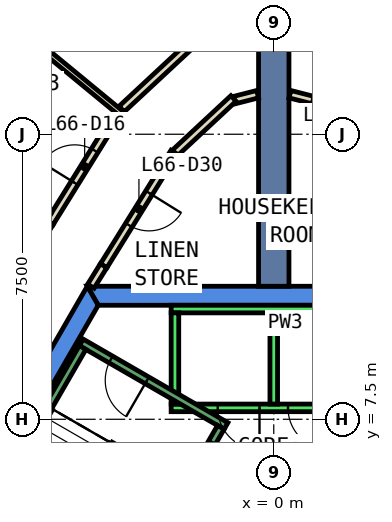
"""IFC4 building model, lengths in metres.
Left out: names, types, materials, properties, quantities, classifications, styles, units other than length and angle.
Written with IfcOpenShell. Run it as: python <this file> out.ifc"""

import sys

from ifc_helpers import new_model, si_unit, direction, frame, frame_2d, origin, place, context, subcontext, project, spatial, polyline, rectangle, outline, extrude, element, fill, save


model = new_model("IFC4")
c1 = context("Model", 3, precision=1e-05, world=origin(), true_north=direction((0.0, 1.0)))
c2 = subcontext(c1, "Body", "Model", "MODEL_VIEW")
j1 = project(units=[si_unit("LENGTHUNIT", "METRE"), si_unit("PLANEANGLEUNIT", "RADIAN")], contexts=[c1])
p1 = place(None, origin())
s1 = spatial("IfcSite", under=j1, at=p1, CompositionType="ELEMENT")
p2 = place(p1, origin())
s2 = spatial("IfcBuilding", under=s1, at=p2, CompositionType="ELEMENT")
p3 = place(p2, frame((0.0, 0.0, 286.4)))
s3 = spatial("IfcBuildingStorey", under=s2, at=p3, CompositionType="ELEMENT", Elevation=286.4)
p4 = place(p3, frame((0.0, 0.0, -0.6)))
e1 = element("IfcWall", 1, at=p4, inside=s3, PredefinedType="SHEAR", context=c2, shape_type="SweptSolid", body=[
    extrude(outline(polyline([(4.907, 11.0), (-4.907, 11.0), (-4.619, 10.5), (4.619, 10.5), (4.907, 11.0)])), origin(), (0.0, 0.0, 1.0), 3.86),
])
p5 = place(p3, frame((0.0, 0.0, -0.6)))
e2 = element("IfcWall", 2, at=p5, inside=s3, PredefinedType="SHEAR", context=c2, shape_type="SweptSolid", body=[
    extrude(outline(polyline([(-9.236, 3.502), (-8.803, 3.253), (-4.619, 10.5), (-4.907, 11.0), (-9.236, 3.502)])), origin(), (0.0, 0.0, 1.0), 3.86),
])
p6 = place(p3, frame((0.0, 11.0, -0.6), z_axis=(0.0, 0.0, 1.0), x_axis=(0.0, 1.0, 0.0)))
e3 = element("IfcWall", 3, at=p6, inside=s3, PredefinedType="SHEAR", context=c2, shape_type="SweptSolid", body=[
    extrude(rectangle(XDim=9.0, YDim=0.8, at=frame_2d((4.5, 0.0))), origin(), (0.0, 0.0, 1.0), 3.86),
])
p7 = place(p3, frame((2.6, 14.509, 0.0), z_axis=(0.0, 0.0, 1.0), x_axis=(-0.732355024595, 0.680922989735, 0.0)))
e4 = element("IfcWall", 4, at=p7, inside=s3, PredefinedType="PARTITIONING", context=c2, shape_type="SweptSolid", body=[
    extrude(rectangle(XDim=2.103, YDim=0.2, at=frame_2d((1.051, 0.0))), origin(), (0.0, 0.0, 1.0), 3.26),
])
for number, where, z_axis, x_axis in (
    (5, (1.036, 15.898, 0.0), (0.0, 0.0, 1.0), (-0.969, 0.247, 0.0)),
    (6, (-0.425, 16.054, 0.0), (0.0, 0.0, 1.0), (-0.969, -0.247, 0.0)),
):
    element("IfcWall", number, at=place(p3, frame(where, z_axis=z_axis, x_axis=x_axis)), inside=s3, PredefinedType="PARTITIONING", context=c2, shape_type="SweptSolid", body=[
        extrude(rectangle(XDim=0.63, YDim=0.2, at=frame_2d((0.315, 0.0))), origin(), (0.0, 0.0, 1.0), 3.26),
    ])
p8 = place(p3, frame((-1.06, 15.941, 0.0), z_axis=(0.0, 0.0, 1.0), x_axis=(-0.732355024595, -0.680922989735, 0.0)))
e7 = element("IfcWall", 7, at=p8, inside=s3, PredefinedType="PARTITIONING", context=c2, shape_type="SweptSolid", body=[
    extrude(rectangle(XDim=2.103, YDim=0.2, at=frame_2d((1.051, 0.0))), origin(), (0.0, 0.0, 1.0), 3.26),
])
p9 = place(p3, frame((-2.62, 14.526, 0.0), z_axis=(0.0, 0.0, 1.0), x_axis=(-0.527787942423, -0.849376175692, 0.0)))
e8 = element("IfcWall", 8, at=p9, inside=s3, PredefinedType="PARTITIONING", context=c2, shape_type="SweptSolid", body=[
    extrude(rectangle(XDim=3.517, YDim=0.2, at=frame_2d((1.758, 0.0))), origin(), (0.0, 0.0, 1.0), 3.26),
])
p10 = place(p9, frame((1.258, 0.0, 0.0)))
e9 = element("IfcOpeningElement", 9, at=p10, cuts=e8, PredefinedType="OPENING", context=c2, shape_type="SweptSolid", body=[
    extrude(rectangle(XDim=1.0, YDim=2.1, at=frame_2d((0.5, 1.05))), frame((0.0, 0.11, 0.0), z_axis=(0.0, -1.0, 0.0), x_axis=(1.0, 0.0, 0.0)), (0.0, 0.0, 1.0), 0.22),
])
p11 = place(p3, frame((-4.478, 11.54, 0.0), z_axis=(0.0, 0.0, 1.0), x_axis=(-0.527362861778, -0.849640166198, 0.0)))
e10 = element("IfcWall", 10, at=p11, inside=s3, PredefinedType="PARTITIONING", context=c2, shape_type="SweptSolid", body=[
    extrude(rectangle(XDim=0.633, YDim=0.2, at=frame_2d((0.317, 0.0))), origin(), (0.0, 0.0, 1.0), 3.26),
])
p12 = place(p3, frame((-4.002, 15.663, 0.0), z_axis=(0.0, 0.0, 1.0), x_axis=(0.732331154554, 0.680948661846, 0.0)))
e11 = element("IfcWall", 11, at=p12, inside=s3, PredefinedType="PARTITIONING", context=c2, shape_type="SweptSolid", body=[
    extrude(rectangle(XDim=2.803, YDim=0.2, at=frame_2d((1.402, 0.0))), origin(), (0.0, 0.0, 1.0), 3.26),
])
p13 = place(p3, frame((-5.889, 12.675, 0.0), z_axis=(0.0, 0.0, 1.0), x_axis=(0.527550626699, 0.849523593709, 0.0)))
e12 = element("IfcWall", 12, at=p13, inside=s3, PredefinedType="PARTITIONING", context=c2, shape_type="SweptSolid", body=[
    extrude(rectangle(XDim=3.463, YDim=0.2, at=frame_2d((1.731, 0.0))), origin(), (0.0, 0.0, 1.0), 3.26),
])
p14 = place(p13, frame((1.231, 0.0, 0.0)))
e13 = element("IfcOpeningElement", 13, at=p14, cuts=e12, PredefinedType="OPENING", context=c2, shape_type="SweptSolid", body=[
    extrude(rectangle(XDim=1.0, YDim=2.1, at=frame_2d((0.5, 1.05))), frame((0.0, 0.11, 0.0), z_axis=(0.0, -1.0, 0.0), x_axis=(1.0, 0.0, 0.0)), (0.0, 0.0, 1.0), 0.22),
])
p15 = place(p3, frame((-7.472, 10.127, 0.0), z_axis=(0.0, 0.0, 1.0), x_axis=(0.527707224705, 0.849426326996, 0.0)))
e14 = element("IfcWall", 14, at=p15, inside=s3, PredefinedType="PARTITIONING", context=c2, shape_type="SweptSolid", body=[
    extrude(rectangle(XDim=3.0, YDim=0.2, at=frame_2d((1.5, 0.0))), origin(), (0.0, 0.0, 1.0), 3.26),
])
p16 = place(p3, frame((-3.998, 15.532, 0.0), z_axis=(0.0, 0.0, 1.0), x_axis=(-0.771938186867, 0.635697597649, 0.0)))
e15 = element("IfcWall", 15, at=p16, inside=s3, PredefinedType="PARTITIONING", context=c2, shape_type="SweptSolid", body=[
    extrude(rectangle(XDim=4.432, YDim=0.15, at=frame_2d((2.216, 0.0))), origin(), (0.0, 0.0, 1.0), 3.26),
])
p17 = place(p3, frame((2.7, 7.8, 0.0), z_axis=(0.0, 0.0, 1.0), x_axis=(-1.0, 0.0, 0.0)))
e16 = element("IfcWall", 16, at=p17, inside=s3, PredefinedType="STANDARD", context=c2, shape_type="SweptSolid", body=[
    extrude(rectangle(XDim=5.4, YDim=0.2, at=frame_2d((2.7, 0.0))), origin(), (0.0, 0.0, 1.0), 3.26),
])
p18 = place(p17, frame((1.225, 0.0, 0.0)))
e17 = element("IfcOpeningElement", 17, at=p18, cuts=e16, PredefinedType="OPENING", context=c2, shape_type="SweptSolid", body=[
    extrude(rectangle(XDim=1.1, YDim=2.1, at=frame_2d((0.55, 1.05))), frame((0.0, 0.11, 0.0), z_axis=(0.0, -1.0, 0.0), x_axis=(1.0, 0.0, 0.0)), (0.0, 0.0, 1.0), 0.22),
])
p19 = place(p17, frame((3.075, 0.0, 0.0)))
e18 = element("IfcOpeningElement", 18, at=p19, cuts=e16, PredefinedType="OPENING", context=c2, shape_type="SweptSolid", body=[
    extrude(rectangle(XDim=1.1, YDim=2.1, at=frame_2d((0.55, 1.05))), frame((0.0, 0.11, 0.0), z_axis=(0.0, -1.0, 0.0), x_axis=(1.0, 0.0, 0.0)), (0.0, 0.0, 1.0), 0.22),
])
p20 = place(p3, frame((2.7, 10.4, 0.0), z_axis=(0.0, 0.0, 1.0), x_axis=(-1.0, 0.0, 0.0)))
e19 = element("IfcWall", 19, at=p20, inside=s3, PredefinedType="STANDARD", context=c2, shape_type="SweptSolid", body=[
    extrude(rectangle(XDim=5.4, YDim=0.2, at=frame_2d((2.7, 0.0))), origin(), (0.0, 0.0, 1.0), 3.26),
])
for number, where, z_axis, x_axis in (
    (20, (0.0, 7.9, 0.0), (0.0, 0.0, 1.0), (0.0, 1.0, 0.0)),
    (21, (-2.6, 7.9, 0.0), (0.0, 0.0, 1.0), (0.0, 1.0, 0.0)),
):
    element("IfcWall", number, at=place(p3, frame(where, z_axis=z_axis, x_axis=x_axis)), inside=s3, PredefinedType="STANDARD", context=c2, shape_type="SweptSolid", body=[
        extrude(rectangle(XDim=2.4, YDim=0.2, at=frame_2d((1.2, 0.0))), origin(), (0.0, 0.0, 1.0), 3.26),
    ])
p21 = place(p3, frame((-1.256, 7.324, 0.0), z_axis=(0.0, 0.0, 1.0), x_axis=(-0.866046073146, 0.499964197906, 0.0)))
e22 = element("IfcWall", 22, at=p21, inside=s3, PredefinedType="STANDARD", context=c2, shape_type="SweptSolid", body=[
    extrude(rectangle(XDim=4.4, YDim=0.2, at=frame_2d((2.2, 0.0))), origin(), (0.0, 0.0, 1.0), 3.26),
])
p22 = place(p21, frame((2.4, 0.0, 0.0)))
e23 = element("IfcOpeningElement", 23, at=p22, cuts=e22, PredefinedType="OPENING", context=c2, shape_type="SweptSolid", body=[
    extrude(rectangle(XDim=1.1, YDim=2.2, at=frame_2d((0.55, 1.1))), frame((0.0, 0.11, 0.0), z_axis=(0.0, -1.0, 0.0), x_axis=(1.0, 0.0, 0.0)), (0.0, 0.0, 1.0), 0.22),
])
p23 = place(p3, frame((-1.393, 7.288, 0.0), z_axis=(0.0, 0.0, 1.0), x_axis=(-0.499963383562, -0.866046543262, 0.0)))
e24 = element("IfcWall", 24, at=p23, inside=s3, PredefinedType="STANDARD", context=c2, shape_type="SweptSolid", body=[
    extrude(rectangle(XDim=6.9, YDim=0.2, at=frame_2d((3.45, 0.0))), origin(), (0.0, 0.0, 1.0), 3.26),
])
p24 = place(p23, frame((0.45, 0.0, 0.0)))
e25 = element("IfcOpeningElement", 25, at=p24, cuts=e24, PredefinedType="OPENING", context=c2, shape_type="SweptSolid", body=[
    extrude(rectangle(XDim=1.1, YDim=2.2, at=frame_2d((0.55, 1.1))), frame((0.0, 0.11, 0.0), z_axis=(0.0, -1.0, 0.0), x_axis=(1.0, 0.0, 0.0)), (0.0, 0.0, 1.0), 0.22),
])
p25 = place(p3, frame((-5.03, 9.388, 0.0), z_axis=(0.0, 0.0, 1.0), x_axis=(-0.499978703459, -0.866037698999, 0.0)))
e26 = element("IfcWall", 26, at=p25, inside=s3, PredefinedType="STANDARD", context=c2, shape_type="SweptSolid", body=[
    extrude(rectangle(XDim=6.9, YDim=0.2, at=frame_2d((3.45, 0.0))), origin(), (0.0, 0.0, 1.0), 3.26),
])
p26 = place(p14, origin())
e27 = element("IfcDoor", 27, at=p26, inside=s3, OperationType="SINGLE_SWING_LEFT", PredefinedType="DOOR", context=c2, shape_type="SweptSolid", body=[
    extrude(rectangle(XDim=1.0, YDim=2.1, at=frame_2d((0.5, 1.05))), frame((0.0, 0.025, 0.0), z_axis=(0.0, -1.0, 0.0), x_axis=(1.0, 0.0, 0.0)), (0.0, 0.0, 1.0), 0.05),
])
fill(e13, e27)
p27 = place(p10, origin())
e28 = element("IfcDoor", 28, at=p27, inside=s3, OperationType="SINGLE_SWING_RIGHT", PredefinedType="DOOR", context=c2, shape_type="SweptSolid", body=[
    extrude(rectangle(XDim=1.0, YDim=2.1, at=frame_2d((0.5, 1.05))), frame((0.0, 0.025, 0.0), z_axis=(0.0, -1.0, 0.0), x_axis=(1.0, 0.0, 0.0)), (0.0, 0.0, 1.0), 0.05),
])
fill(e9, e28)
p28 = place(p18, origin())
e29 = element("IfcDoor", 29, at=p28, inside=s3, OperationType="SLIDING_TO_LEFT", PredefinedType="DOOR", context=c2, shape_type="SweptSolid", body=[
    extrude(rectangle(XDim=1.1, YDim=2.1, at=frame_2d((0.55, 1.05))), frame((0.0, 0.025, 0.0), z_axis=(0.0, -1.0, 0.0), x_axis=(1.0, 0.0, 0.0)), (0.0, 0.0, 1.0), 0.05),
])
fill(e17, e29)
p29 = place(p19, origin())
e30 = element("IfcDoor", 30, at=p29, inside=s3, OperationType="SLIDING_TO_LEFT", PredefinedType="DOOR", context=c2, shape_type="SweptSolid", body=[
    extrude(rectangle(XDim=1.1, YDim=2.1, at=frame_2d((0.55, 1.05))), frame((0.0, 0.025, 0.0), z_axis=(0.0, -1.0, 0.0), x_axis=(1.0, 0.0, 0.0)), (0.0, 0.0, 1.0), 0.05),
])
fill(e18, e30)
p30 = place(p24, origin())
e31 = element("IfcDoor", 31, at=p30, inside=s3, OperationType="SINGLE_SWING_LEFT", PredefinedType="DOOR", context=c2, shape_type="SweptSolid", body=[
    extrude(rectangle(XDim=1.1, YDim=2.2, at=frame_2d((0.55, 1.1))), frame((0.0, 0.025, 0.0), z_axis=(0.0, -1.0, 0.0), x_axis=(1.0, 0.0, 0.0)), (0.0, 0.0, 1.0), 0.05),
])
fill(e25, e31)
p31 = place(p22, origin())
e32 = element("IfcDoor", 32, at=p31, inside=s3, OperationType="SINGLE_SWING_LEFT", PredefinedType="DOOR", context=c2, shape_type="SweptSolid", body=[
    extrude(rectangle(XDim=1.1, YDim=2.2, at=frame_2d((0.55, 1.1))), frame((0.0, 0.025, 0.0), z_axis=(0.0, -1.0, 0.0), x_axis=(1.0, 0.0, 0.0)), (0.0, 0.0, 1.0), 0.05),
])
fill(e23, e32)
save(model, sys.argv[1])
